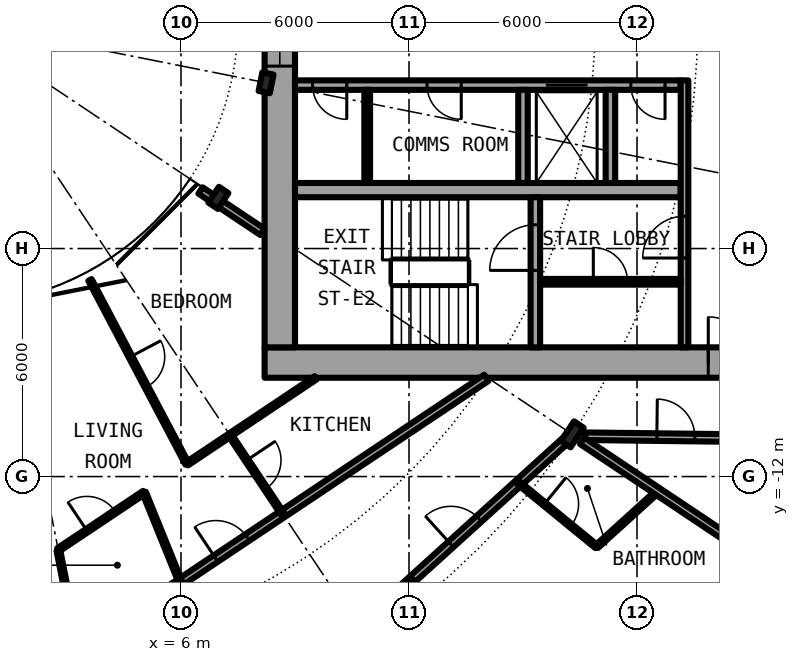
"""IFC4 building model, lengths in metres.
Left out: names, types, materials, properties, quantities, classifications, styles, units other than length and angle.
Written with IfcOpenShell. Run it as: python <this file> out.ifc"""

import sys

from ifc_helpers import new_model, si_unit, direction, frame, frame_2d, origin, origin_2d, place, context, subcontext, project, spatial, rectangle, i_section, extrude, element, fill, save


model = new_model("IFC4")
c1 = context("Model", 3, precision=1e-05, world=origin(), true_north=direction((0.0, 1.0)))
c2 = subcontext(c1, "Body", "Model", "MODEL_VIEW")
j1 = project(units=[si_unit("LENGTHUNIT", "METRE"), si_unit("PLANEANGLEUNIT", "RADIAN")], contexts=[c1])
p1 = place(None, origin())
s1 = spatial("IfcSite", under=j1, at=p1, CompositionType="ELEMENT")
p2 = place(p1, origin())
s2 = spatial("IfcBuilding", under=s1, at=p2, CompositionType="ELEMENT")
p3 = place(p2, frame((0.0, 0.0, 31.95)))
s3 = spatial("IfcBuildingStorey", under=s2, at=p3, CompositionType="ELEMENT", Elevation=31.95)
p4 = place(p3, frame((16.297, -10.889, 0.0), z_axis=(0.0, 0.0, 1.0), x_axis=(0.831469612303, -0.55557023302, 0.0)))
e1 = element("IfcColumn", 1, at=p4, inside=s3, PredefinedType="COLUMN", context=c2, shape_type="SweptSolid", body=[
    extrude(i_section(OverallWidth=0.305, OverallDepth=0.62, WebThickness=0.021, FlangeThickness=0.04, FilletRadius=0.027, at=origin_2d()), origin(), (0.0, 0.0, 1.0), 3.05),
])
for number, where, z_axis, x_axis in (
    (2, (6.984, -4.667, 0.0), (0.0, 0.0, 1.0), (0.831, -0.556, 0.0)),
    (3, (8.239, -1.639, 0.0), (0.0, 0.0, 1.0), (0.981, -0.195, 0.0)),
):
    element("IfcColumn", number, at=place(p3, frame(where, z_axis=z_axis, x_axis=x_axis)), inside=s3, PredefinedType="COLUMN", context=c2, shape_type="SweptSolid", body=[
        extrude(i_section(OverallWidth=0.3, OverallDepth=0.5, WebThickness=0.014, FlangeThickness=0.028, FilletRadius=0.027, at=origin_2d()), origin(), (0.0, 0.0, 1.0), 3.05),
    ])
p5 = place(p3, frame((8.2, -9.0, 0.0), z_axis=(0.0, 0.0, 1.0), x_axis=(1.0, 0.0, 0.0)))
e4 = element("IfcWall", 4, at=p5, inside=s3, PredefinedType="SHEAR", context=c2, shape_type="SweptSolid", body=[
    extrude(rectangle(XDim=14.2, YDim=0.8, at=frame_2d((7.1, 0.0))), origin(), (0.0, 0.0, 1.0), 3.05),
])
p6 = place(p5, frame((11.675, 0.0, 0.0)))
e5 = element("IfcOpeningElement", 5, at=p6, cuts=e4, PredefinedType="OPENING", context=c2, shape_type="SweptSolid", body=[
    extrude(rectangle(XDim=1.2, YDim=2.3, at=frame_2d((0.6, 1.15))), frame((0.0, 0.41, 0.0), z_axis=(0.0, -1.0, 0.0), x_axis=(1.0, 0.0, 0.0)), (0.0, 0.0, 1.0), 0.82),
])
p7 = place(p3, frame((8.6, -8.6, 0.0), z_axis=(0.0, 0.0, 1.0), x_axis=(0.0, 1.0, 0.0)))
e6 = element("IfcWall", 6, at=p7, inside=s3, PredefinedType="SHEAR", context=c2, shape_type="SweptSolid", body=[
    extrude(rectangle(XDim=17.2, YDim=0.8, at=frame_2d((8.6, 0.0))), origin(), (0.0, 0.0, 1.0), 3.05),
])
p8 = place(p7, frame((7.4, 0.0, 0.1)))
e7 = element("IfcOpeningElement", 7, at=p8, cuts=e6, PredefinedType="OPENING", context=c2, shape_type="SweptSolid", body=[
    extrude(rectangle(XDim=2.4, YDim=2.2, at=frame_2d((1.2, 1.1))), frame((0.0, 0.41, 0.0), z_axis=(0.0, -1.0, 0.0), x_axis=(1.0, 0.0, 0.0)), (0.0, 0.0, 1.0), 0.82),
])
p9 = place(p3, frame((19.15, -1.7, 0.0), z_axis=(0.0, 0.0, 1.0), x_axis=(-1.0, 0.0, 0.0)))
e8 = element("IfcWall", 8, at=p9, inside=s3, PredefinedType="SHEAR", context=c2, shape_type="SweptSolid", body=[
    extrude(rectangle(XDim=10.15, YDim=0.25, at=frame_2d((5.075, 0.0))), origin(), (0.0, 0.0, 1.0), 3.05),
])
p10 = place(p9, frame((2.45, 0.0, 0.0)))
e9 = element("IfcOpeningElement", 9, at=p10, cuts=e8, PredefinedType="OPENING", context=c2, shape_type="SweptSolid", body=[
    extrude(rectangle(XDim=1.1, YDim=2.3, at=frame_2d((0.55, 1.15))), frame((0.0, 0.135, 0.0), z_axis=(0.0, -1.0, 0.0), x_axis=(1.0, 0.0, 0.0)), (0.0, 0.0, 1.0), 0.27),
])
p11 = place(p9, frame((8.788, 0.0, 0.0)))
e10 = element("IfcOpeningElement", 10, at=p11, cuts=e8, PredefinedType="OPENING", context=c2, shape_type="SweptSolid", body=[
    extrude(rectangle(XDim=0.9, YDim=2.3, at=frame_2d((0.45, 1.15))), frame((0.0, 0.135, 0.0), z_axis=(0.0, -1.0, 0.0), x_axis=(1.0, 0.0, 0.0)), (0.0, 0.0, 1.0), 0.27),
])
p12 = place(p9, frame((5.775, 0.0, 0.0)))
e11 = element("IfcOpeningElement", 11, at=p12, cuts=e8, PredefinedType="OPENING", context=c2, shape_type="SweptSolid", body=[
    extrude(rectangle(XDim=0.9, YDim=2.3, at=frame_2d((0.45, 1.15))), frame((0.0, 0.135, 0.0), z_axis=(0.0, -1.0, 0.0), x_axis=(1.0, 0.0, 0.0)), (0.0, 0.0, 1.0), 0.27),
])
p13 = place(p9, frame((0.413, 0.0, 0.0)))
e12 = element("IfcOpeningElement", 12, at=p13, cuts=e8, PredefinedType="OPENING", context=c2, shape_type="SweptSolid", body=[
    extrude(rectangle(XDim=0.9, YDim=2.3, at=frame_2d((0.45, 1.15))), frame((0.0, 0.135, 0.0), z_axis=(0.0, -1.0, 0.0), x_axis=(1.0, 0.0, 0.0)), (0.0, 0.0, 1.0), 0.27),
])
p14 = place(p3, frame((9.0, -4.462, 0.0), z_axis=(0.0, 0.0, 1.0), x_axis=(1.0, 0.0, 0.0)))
e13 = element("IfcWall", 13, at=p14, inside=s3, PredefinedType="SHEAR", context=c2, shape_type="SweptSolid", body=[
    extrude(rectangle(XDim=10.15, YDim=0.375, at=frame_2d((5.075, 0.0))), origin(), (0.0, 0.0, 1.0), 3.05),
])
p15 = place(p3, frame((15.325, -8.6, 0.0), z_axis=(0.0, 0.0, 1.0), x_axis=(0.0, 1.0, 0.0)))
e14 = element("IfcWall", 14, at=p15, inside=s3, PredefinedType="SHEAR", context=c2, shape_type="SweptSolid", body=[
    extrude(rectangle(XDim=3.95, YDim=0.25, at=frame_2d((1.975, 0.0))), origin(), (0.0, 0.0, 1.0), 3.05),
])
p16 = place(p15, frame((2.025, 0.0, 0.0)))
e15 = element("IfcOpeningElement", 15, at=p16, cuts=e14, PredefinedType="OPENING", context=c2, shape_type="SweptSolid", body=[
    extrude(rectangle(XDim=1.2, YDim=2.3, at=frame_2d((0.6, 1.15))), frame((0.0, 0.135, 0.0), z_axis=(0.0, -1.0, 0.0), x_axis=(1.0, 0.0, 0.0)), (0.0, 0.0, 1.0), 0.27),
])
for number, where, z_axis, x_axis in (
    (16, (15.0, -1.825, 0.0), (0.0, 0.0, 1.0), (0.0, -1.0, 0.0)),
    (17, (17.3, -1.825, 0.0), (0.0, 0.0, 1.0), (0.0, -1.0, 0.0)),
):
    element("IfcWall", number, at=place(p3, frame(where, z_axis=z_axis, x_axis=x_axis)), inside=s3, PredefinedType="SOLIDWALL", context=c2, shape_type="SweptSolid", body=[
        extrude(rectangle(XDim=2.45, YDim=0.25, at=frame_2d((1.225, 0.0))), origin(), (0.0, 0.0, 1.0), 2.7),
    ])
p17 = place(p3, frame((19.25, -8.6, 0.0), z_axis=(0.0, 0.0, 1.0), x_axis=(0.0, 1.0, 0.0)))
e18 = element("IfcWall", 18, at=p17, inside=s3, PredefinedType="SOLIDWALL", context=c2, shape_type="SweptSolid", body=[
    extrude(rectangle(XDim=7.025, YDim=0.2, at=frame_2d((3.513, 0.0))), origin(), (0.0, 0.0, 1.0), 2.7),
])
p18 = place(p17, frame((2.35, 0.0, 0.0)))
e19 = element("IfcOpeningElement", 19, at=p18, cuts=e18, PredefinedType="OPENING", context=c2, shape_type="SweptSolid", body=[
    extrude(rectangle(XDim=1.1, YDim=2.3, at=frame_2d((0.55, 1.15))), frame((0.0, 0.11, 0.0), z_axis=(0.0, -1.0, 0.0), x_axis=(1.0, 0.0, 0.0)), (0.0, 0.0, 1.0), 0.22),
])
p19 = place(p3, frame((10.9, -1.825, 0.0), z_axis=(0.0, 0.0, 1.0), x_axis=(0.0, -1.0, 0.0)))
e20 = element("IfcWall", 20, at=p19, inside=s3, PredefinedType="PARTITIONING", context=c2, shape_type="SweptSolid", body=[
    extrude(rectangle(XDim=2.45, YDim=0.15, at=frame_2d((1.225, 0.0))), origin(), (0.0, 0.0, 1.0), 2.7),
])
p20 = place(p3, frame((15.45, -6.875, 0.0), z_axis=(0.0, 0.0, 1.0), x_axis=(1.0, 0.0, 0.0)))
e21 = element("IfcWall", 21, at=p20, inside=s3, PredefinedType="PARTITIONING", context=c2, shape_type="SweptSolid", body=[
    extrude(rectangle(XDim=3.7, YDim=0.15, at=frame_2d((1.85, 0.0))), origin(), (0.0, 0.0, 1.0), 2.7),
])
p21 = place(p20, frame((1.4, 0.0, 0.0)))
e22 = element("IfcOpeningElement", 22, at=p21, cuts=e21, PredefinedType="OPENING", context=c2, shape_type="SweptSolid", body=[
    extrude(rectangle(XDim=0.9, YDim=2.3, at=frame_2d((0.45, 1.15))), frame((0.0, 0.085, 0.0), z_axis=(0.0, -1.0, 0.0), x_axis=(1.0, 0.0, 0.0)), (0.0, 0.0, 1.0), 0.17),
])
p22 = place(p3, frame((16.936, -13.845, 0.0), z_axis=(0.0, 0.0, 1.0), x_axis=(0.740836325503, 0.671685595212, 0.0)))
e23 = element("IfcWall", 23, at=p22, inside=s3, PredefinedType="PARTITIONING", context=c2, shape_type="SweptSolid", body=[
    extrude(rectangle(XDim=2.168, YDim=0.1, at=frame_2d((1.084, 0.0))), origin(), (0.0, 0.0, 1.0), 2.7),
])
p23 = place(p3, frame((9.239, -17.286, 0.0), z_axis=(0.0, 0.0, 1.0), x_axis=(0.74089212117, 0.671624050186, 0.0)))
e24 = element("IfcWall", 24, at=p23, inside=s3, PredefinedType="PARTITIONING", context=c2, shape_type="SweptSolid", body=[
    extrude(rectangle(XDim=9.368, YDim=0.2, at=frame_2d((4.684, 0.0))), origin(), (0.0, 0.0, 1.0), 2.38),
])
p24 = place(p23, frame((5.215, 0.0, 0.0)))
e25 = element("IfcOpeningElement", 25, at=p24, cuts=e24, PredefinedType="OPENING", context=c2, shape_type="SweptSolid", body=[
    extrude(rectangle(XDim=1.0, YDim=2.3, at=frame_2d((0.5, 1.15))), frame((0.0, 0.11, 0.0), z_axis=(0.0, -1.0, 0.0), x_axis=(1.0, 0.0, 0.0)), (0.0, 0.0, 1.0), 0.22),
])
p25 = place(p3, frame((3.297, -16.575, 0.0), z_axis=(0.0, 0.0, 1.0), x_axis=(0.831561346449, 0.555432918625, 0.0)))
e26 = element("IfcWall", 26, at=p25, inside=s3, PredefinedType="PARTITIONING", context=c2, shape_type="SweptSolid", body=[
    extrude(rectangle(XDim=12.914, YDim=0.2, at=frame_2d((6.457, 0.0))), origin(), (0.0, 0.0, 1.0), 2.7),
])
p26 = place(p25, frame((4.352, 0.0, 0.0)))
e27 = element("IfcOpeningElement", 27, at=p26, cuts=e26, PredefinedType="OPENING", context=c2, shape_type="SweptSolid", body=[
    extrude(rectangle(XDim=1.0, YDim=2.3, at=frame_2d((0.5, 1.15))), frame((0.0, 0.11, 0.0), z_axis=(0.0, -1.0, 0.0), x_axis=(1.0, 0.0, 0.0)), (0.0, 0.0, 1.0), 0.22),
])
p27 = place(p3, frame((2.77, -13.927, 0.0), z_axis=(0.0, 0.0, 1.0), x_axis=(0.831538390496, 0.555467285384, 0.0)))
e28 = element("IfcWall", 28, at=p27, inside=s3, PredefinedType="PARTITIONING", context=c2, shape_type="SweptSolid", body=[
    extrude(rectangle(XDim=2.717, YDim=0.1, at=frame_2d((1.358, 0.0))), origin(), (0.0, 0.0, 1.0), 2.7),
])
p28 = place(p27, frame((0.908, 0.0, 0.0)))
e29 = element("IfcOpeningElement", 29, at=p28, cuts=e28, PredefinedType="OPENING", context=c2, shape_type="SweptSolid", body=[
    extrude(rectangle(XDim=0.9, YDim=2.3, at=frame_2d((0.45, 1.15))), frame((0.0, 0.06, 0.0), z_axis=(0.0, -1.0, 0.0), x_axis=(1.0, 0.0, 0.0)), (0.0, 0.0, 1.0), 0.12),
])
p29 = place(p3, frame((6.158, -11.664, 0.0), z_axis=(0.0, 0.0, 1.0), x_axis=(0.831459707426, 0.555585056429, 0.0)))
e30 = element("IfcWall", 30, at=p29, inside=s3, PredefinedType="PARTITIONING", context=c2, shape_type="SweptSolid", body=[
    extrude(rectangle(XDim=4.073, YDim=0.1, at=frame_2d((2.037, 0.0))), origin(), (0.0, 0.0, 1.0), 2.7),
])
p30 = place(p3, frame((16.636, -10.939, 0.0), z_axis=(0.0, 0.0, 1.0), x_axis=(0.999926652916, -0.012111514691, 0.0)))
e31 = element("IfcWall", 31, at=p30, inside=s3, PredefinedType="PARTITIONING", context=c2, shape_type="SweptSolid", body=[
    extrude(rectangle(XDim=5.04, YDim=0.2, at=frame_2d((2.52, 0.0))), origin(), (0.0, 0.0, 1.0), 2.7),
])
p31 = place(p30, frame((1.886, 0.0, 0.0)))
e32 = element("IfcOpeningElement", 32, at=p31, cuts=e31, PredefinedType="OPENING", context=c2, shape_type="SweptSolid", body=[
    extrude(rectangle(XDim=1.0, YDim=2.3, at=frame_2d((0.5, 1.15))), frame((0.0, 0.11, 0.0), z_axis=(0.0, -1.0, 0.0), x_axis=(1.0, 0.0, 0.0)), (0.0, 0.0, 1.0), 0.22),
])
p32 = place(p3, frame((6.513, -4.472, 0.0), z_axis=(0.0, 0.0, 1.0), x_axis=(0.831417956244, -0.555647533996, 0.0)))
e33 = element("IfcWall", 33, at=p32, inside=s3, PredefinedType="PARTITIONING", context=c2, shape_type="SweptSolid", body=[
    extrude(rectangle(XDim=1.962, YDim=0.2, at=frame_2d((0.981, 0.0))), origin(), (0.0, 0.0, 1.0), 2.7),
])
p33 = place(p3, frame((3.605, -6.827, 0.0), z_axis=(0.0, 0.0, 1.0), x_axis=(0.466976820365, -0.884269556889, 0.0)))
e34 = element("IfcWall", 34, at=p33, inside=s3, PredefinedType="PARTITIONING", context=c2, shape_type="SweptSolid", body=[
    extrude(rectangle(XDim=5.469, YDim=0.1, at=frame_2d((2.735, 0.0))), origin(), (0.0, 0.0, 1.0), 2.7),
])
p34 = place(p33, frame((2.284, 0.0, 0.0)))
e35 = element("IfcOpeningElement", 35, at=p34, cuts=e34, PredefinedType="OPENING", context=c2, shape_type="SweptSolid", body=[
    extrude(rectangle(XDim=0.9, YDim=2.3, at=frame_2d((0.45, 1.15))), frame((0.0, 0.06, 0.0), z_axis=(0.0, -1.0, 0.0), x_axis=(1.0, 0.0, 0.0)), (0.0, 0.0, 1.0), 0.12),
])
p35 = place(p3, frame((5.029, -12.418, 0.0), z_axis=(0.0, 0.0, 1.0), x_axis=(0.375649498413, -0.926761811008, 0.0)))
e36 = element("IfcWall", 36, at=p35, inside=s3, PredefinedType="PARTITIONING", context=c2, shape_type="SweptSolid", body=[
    extrude(rectangle(XDim=2.548, YDim=0.1, at=frame_2d((1.274, 0.0))), origin(), (0.0, 0.0, 1.0), 2.7),
])
p36 = place(p3, frame((7.289, -10.908, 0.0), z_axis=(0.0, 0.0, 1.0), x_axis=(0.555355163998, -0.831613276602, 0.0)))
e37 = element("IfcWall", 37, at=p36, inside=s3, PredefinedType="PARTITIONING", context=c2, shape_type="SweptSolid", body=[
    extrude(rectangle(XDim=2.494, YDim=0.1, at=frame_2d((1.247, 0.0))), origin(), (0.0, 0.0, 1.0), 2.7),
])
p37 = place(p36, frame((0.797, 0.0, 0.0)))
e38 = element("IfcOpeningElement", 38, at=p37, cuts=e37, PredefinedType="OPENING", context=c2, shape_type="SweptSolid", body=[
    extrude(rectangle(XDim=0.9, YDim=2.3, at=frame_2d((0.45, 1.15))), frame((0.0, 0.06, 0.0), z_axis=(0.0, -1.0, 0.0), x_axis=(1.0, 0.0, 0.0)), (0.0, 0.0, 1.0), 0.12),
])
p38 = place(p3, frame((12.062, -14.727, 0.0), z_axis=(0.0, 0.0, 1.0), x_axis=(0.633664062855, -0.773608334654, 0.0)))
e39 = element("IfcWall", 39, at=p38, inside=s3, PredefinedType="PARTITIONING", context=c2, shape_type="SweptSolid", body=[
    extrude(rectangle(XDim=8.138, YDim=0.1, at=frame_2d((4.069, 0.0))), origin(), (0.0, 0.0, 1.0), 2.7),
])
p39 = place(p38, frame((0.861, 0.0, 0.0)))
e40 = element("IfcOpeningElement", 40, at=p39, cuts=e39, PredefinedType="OPENING", context=c2, shape_type="SweptSolid", body=[
    extrude(rectangle(XDim=0.9, YDim=2.3, at=frame_2d((0.45, 1.15))), frame((0.0, 0.06, 0.0), z_axis=(0.0, -1.0, 0.0), x_axis=(1.0, 0.0, 0.0)), (0.0, 0.0, 1.0), 0.12),
])
p40 = place(p38, frame((4.931, 0.0, 0.0)))
e41 = element("IfcOpeningElement", 41, at=p40, cuts=e39, PredefinedType="OPENING", context=c2, shape_type="SweptSolid", body=[
    extrude(rectangle(XDim=0.9, YDim=2.3, at=frame_2d((0.45, 1.15))), frame((0.0, 0.06, 0.0), z_axis=(0.0, -1.0, 0.0), x_axis=(1.0, 0.0, 0.0)), (0.0, 0.0, 1.0), 0.12),
])
p41 = place(p3, frame((14.885, -12.168, 0.0), z_axis=(0.0, 0.0, 1.0), x_axis=(0.774162545943, -0.632986850147, 0.0)))
e42 = element("IfcWall", 42, at=p41, inside=s3, PredefinedType="PARTITIONING", context=c2, shape_type="SweptSolid", body=[
    extrude(rectangle(XDim=2.649, YDim=0.1, at=frame_2d((1.325, 0.0))), origin(), (0.0, 0.0, 1.0), 2.7),
])
p42 = place(p41, frame((0.875, 0.0, 0.0)))
e43 = element("IfcOpeningElement", 43, at=p42, cuts=e42, PredefinedType="OPENING", context=c2, shape_type="SweptSolid", body=[
    extrude(rectangle(XDim=0.9, YDim=2.3, at=frame_2d((0.45, 1.15))), frame((0.0, 0.06, 0.0), z_axis=(0.0, -1.0, 0.0), x_axis=(1.0, 0.0, 0.0)), (0.0, 0.0, 1.0), 0.12),
])
p43 = place(p3, frame((16.555, -11.061, 0.0), z_axis=(0.0, 0.0, 1.0), x_axis=(0.831507055747, -0.555514190857, 0.0)))
e44 = element("IfcWall", 44, at=p43, inside=s3, PredefinedType="PARTITIONING", context=c2, shape_type="SweptSolid", body=[
    extrude(rectangle(XDim=7.265, YDim=0.2, at=frame_2d((3.633, 0.0))), origin(), (0.0, 0.0, 1.0), 2.7),
])
p44 = place(p3, frame((3.293, -16.554, 0.0), z_axis=(0.0, 0.0, 1.0), x_axis=(-0.195338620417, 0.980735858105, 0.0)))
e45 = element("IfcWall", 45, at=p44, inside=s3, PredefinedType="PARTITIONING", context=c2, shape_type="SweptSolid", body=[
    extrude(rectangle(XDim=2.657, YDim=0.1, at=frame_2d((1.329, 0.0))), origin(), (0.0, 0.0, 1.0), 2.7),
])
p45 = place(p10, origin())
e46 = element("IfcDoor", 46, at=p45, inside=s3, OperationType="DOUBLE_DOOR_SLIDING", PredefinedType="DOOR", context=c2, shape_type="SweptSolid", body=[
    extrude(rectangle(XDim=1.1, YDim=2.3, at=frame_2d((0.55, 1.15))), frame((0.0, 0.025, 0.0), z_axis=(0.0, -1.0, 0.0), x_axis=(1.0, 0.0, 0.0)), (0.0, 0.0, 1.0), 0.05),
])
fill(e9, e46)
p46 = place(p11, origin())
e47 = element("IfcDoor", 47, at=p46, inside=s3, OperationType="SINGLE_SWING_LEFT", PredefinedType="DOOR", context=c2, shape_type="SweptSolid", body=[
    extrude(rectangle(XDim=0.9, YDim=2.3, at=frame_2d((0.45, 1.15))), frame((0.0, 0.025, 0.0), z_axis=(0.0, -1.0, 0.0), x_axis=(1.0, 0.0, 0.0)), (0.0, 0.0, 1.0), 0.05),
])
fill(e10, e47)
p47 = place(p12, origin())
e48 = element("IfcDoor", 48, at=p47, inside=s3, OperationType="SINGLE_SWING_LEFT", PredefinedType="DOOR", context=c2, shape_type="SweptSolid", body=[
    extrude(rectangle(XDim=0.9, YDim=2.3, at=frame_2d((0.45, 1.15))), frame((0.0, 0.025, 0.0), z_axis=(0.0, -1.0, 0.0), x_axis=(1.0, 0.0, 0.0)), (0.0, 0.0, 1.0), 0.05),
])
fill(e11, e48)
p48 = place(p13, origin())
e49 = element("IfcDoor", 49, at=p48, inside=s3, OperationType="SINGLE_SWING_RIGHT", PredefinedType="DOOR", context=c2, shape_type="SweptSolid", body=[
    extrude(rectangle(XDim=0.9, YDim=2.3, at=frame_2d((0.45, 1.15))), frame((0.0, 0.025, 0.0), z_axis=(0.0, -1.0, 0.0), x_axis=(1.0, 0.0, 0.0)), (0.0, 0.0, 1.0), 0.05),
])
fill(e12, e49)
p49 = place(p21, origin())
e50 = element("IfcDoor", 50, at=p49, inside=s3, OperationType="SINGLE_SWING_LEFT", PredefinedType="DOOR", context=c2, shape_type="SweptSolid", body=[
    extrude(rectangle(XDim=0.9, YDim=2.3, at=frame_2d((0.45, 1.15))), frame((0.0, 0.025, 0.0), z_axis=(0.0, -1.0, 0.0), x_axis=(1.0, 0.0, 0.0)), (0.0, 0.0, 1.0), 0.05),
])
fill(e22, e50)
p50 = place(p16, origin())
e51 = element("IfcDoor", 51, at=p50, inside=s3, OperationType="SINGLE_SWING_LEFT", PredefinedType="DOOR", context=c2, shape_type="SweptSolid", body=[
    extrude(rectangle(XDim=1.2, YDim=2.3, at=frame_2d((0.6, 1.15))), frame((0.0, 0.025, 0.0), z_axis=(0.0, -1.0, 0.0), x_axis=(1.0, 0.0, 0.0)), (0.0, 0.0, 1.0), 0.05),
])
fill(e15, e51)
p51 = place(p18, origin())
e52 = element("IfcDoor", 52, at=p51, inside=s3, OperationType="SINGLE_SWING_RIGHT", PredefinedType="DOOR", context=c2, shape_type="SweptSolid", body=[
    extrude(rectangle(XDim=1.1, YDim=2.3, at=frame_2d((0.55, 1.15))), frame((0.0, 0.025, 0.0), z_axis=(0.0, -1.0, 0.0), x_axis=(1.0, 0.0, 0.0)), (0.0, 0.0, 1.0), 0.05),
])
fill(e19, e52)
p52 = place(p6, origin())
e53 = element("IfcDoor", 53, at=p52, inside=s3, OperationType="SINGLE_SWING_LEFT", PredefinedType="DOOR", context=c2, shape_type="SweptSolid", body=[
    extrude(rectangle(XDim=1.2, YDim=2.3, at=frame_2d((0.6, 1.15))), frame((0.0, 0.025, 0.0), z_axis=(0.0, -1.0, 0.0), x_axis=(1.0, 0.0, 0.0)), (0.0, 0.0, 1.0), 0.05),
])
fill(e5, e53)
p53 = place(p8, origin())
e54 = element("IfcWindow", 54, at=p53, inside=s3, PartitioningType="SINGLE_PANEL", PredefinedType="WINDOW", context=c2, shape_type="SweptSolid", body=[
    extrude(rectangle(XDim=2.4, YDim=2.2, at=frame_2d((1.2, 1.1))), frame((0.0, 0.03, 0.0), z_axis=(0.0, -1.0, 0.0), x_axis=(1.0, 0.0, 0.0)), (0.0, 0.0, 1.0), 0.06),
])
fill(e7, e54)
p54 = place(p24, origin())
e55 = element("IfcDoor", 55, at=p54, inside=s3, OperationType="SINGLE_SWING_RIGHT", PredefinedType="DOOR", context=c2, shape_type="SweptSolid", body=[
    extrude(rectangle(XDim=1.0, YDim=2.3, at=frame_2d((0.5, 1.15))), frame((0.0, 0.025, 0.0), z_axis=(0.0, -1.0, 0.0), x_axis=(1.0, 0.0, 0.0)), (0.0, 0.0, 1.0), 0.05),
])
fill(e25, e55)
p55 = place(p42, origin())
e56 = element("IfcDoor", 56, at=p55, inside=s3, OperationType="SINGLE_SWING_RIGHT", PredefinedType="DOOR", context=c2, shape_type="SweptSolid", body=[
    extrude(rectangle(XDim=0.9, YDim=2.3, at=frame_2d((0.45, 1.15))), frame((0.0, 0.025, 0.0), z_axis=(0.0, -1.0, 0.0), x_axis=(1.0, 0.0, 0.0)), (0.0, 0.0, 1.0), 0.05),
])
fill(e43, e56)
p56 = place(p26, origin())
e57 = element("IfcDoor", 57, at=p56, inside=s3, OperationType="SINGLE_SWING_LEFT", PredefinedType="DOOR", context=c2, shape_type="SweptSolid", body=[
    extrude(rectangle(XDim=1.0, YDim=2.3, at=frame_2d((0.5, 1.15))), frame((0.0, 0.025, 0.0), z_axis=(0.0, -1.0, 0.0), x_axis=(1.0, 0.0, 0.0)), (0.0, 0.0, 1.0), 0.05),
])
fill(e27, e57)
p57 = place(p28, origin())
e58 = element("IfcDoor", 58, at=p57, inside=s3, OperationType="SINGLE_SWING_RIGHT", PredefinedType="DOOR", context=c2, shape_type="SweptSolid", body=[
    extrude(rectangle(XDim=0.9, YDim=2.3, at=frame_2d((0.45, 1.15))), frame((0.0, 0.025, 0.0), z_axis=(0.0, -1.0, 0.0), x_axis=(1.0, 0.0, 0.0)), (0.0, 0.0, 1.0), 0.05),
])
fill(e29, e58)
p58 = place(p37, origin())
e59 = element("IfcDoor", 59, at=p58, inside=s3, OperationType="SINGLE_SWING_RIGHT", PredefinedType="DOOR", context=c2, shape_type="SweptSolid", body=[
    extrude(rectangle(XDim=0.9, YDim=2.3, at=frame_2d((0.45, 1.15))), frame((0.0, 0.025, 0.0), z_axis=(0.0, -1.0, 0.0), x_axis=(1.0, 0.0, 0.0)), (0.0, 0.0, 1.0), 0.05),
])
fill(e38, e59)
p59 = place(p34, origin())
e60 = element("IfcDoor", 60, at=p59, inside=s3, OperationType="SINGLE_SWING_RIGHT", PredefinedType="DOOR", context=c2, shape_type="SweptSolid", body=[
    extrude(rectangle(XDim=0.9, YDim=2.3, at=frame_2d((0.45, 1.15))), frame((0.0, 0.025, 0.0), z_axis=(0.0, -1.0, 0.0), x_axis=(1.0, 0.0, 0.0)), (0.0, 0.0, 1.0), 0.05),
])
fill(e35, e60)
p60 = place(p31, origin())
e61 = element("IfcDoor", 61, at=p60, inside=s3, OperationType="SINGLE_SWING_LEFT", PredefinedType="DOOR", context=c2, shape_type="SweptSolid", body=[
    extrude(rectangle(XDim=1.0, YDim=2.3, at=frame_2d((0.5, 1.15))), frame((0.0, 0.025, 0.0), z_axis=(0.0, -1.0, 0.0), x_axis=(1.0, 0.0, 0.0)), (0.0, 0.0, 1.0), 0.05),
])
fill(e32, e61)
save(model, sys.argv[1])
